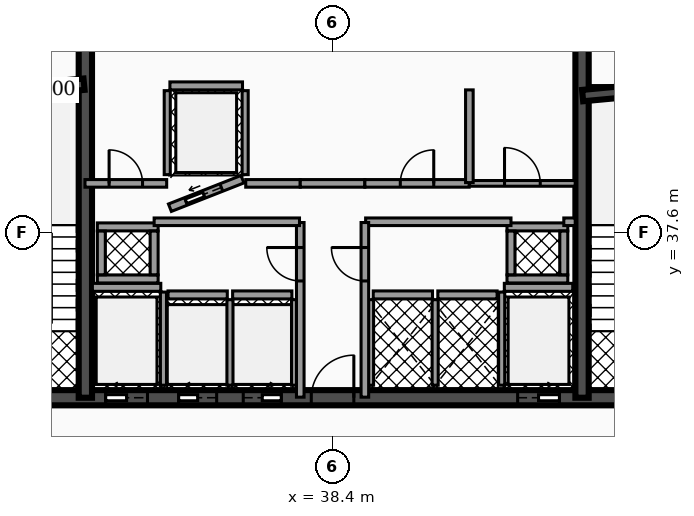
"""IFC4 building model, lengths in metres.
Left out: names, types, materials, properties, quantities, classifications, styles, units other than length and angle.
Written with IfcOpenShell. Run it as: python <this file> out.ifc"""

import sys

from ifc_helpers import new_model, si_unit, direction, frame, frame_2d, origin, place, context, subcontext, project, spatial, rectangle, extrude, element, fill, save


model = new_model("IFC4")
c1 = context("Model", 3, precision=1e-05, world=origin(), true_north=direction((0.0, 1.0)))
c2 = subcontext(c1, "Body", "Model", "MODEL_VIEW")
j1 = project(units=[si_unit("LENGTHUNIT", "METRE"), si_unit("PLANEANGLEUNIT", "RADIAN")], contexts=[c1])
p1 = place(None, origin())
s1 = spatial("IfcSite", under=j1, at=p1, CompositionType="ELEMENT")
p2 = place(p1, origin())
s2 = spatial("IfcBuilding", under=s1, at=p2, CompositionType="ELEMENT")
p3 = place(p2, frame((0.0, 0.0, 187.0)))
s3 = spatial("IfcBuildingStorey", under=s2, at=p3, CompositionType="ELEMENT", Elevation=187.0)
p4 = place(p3, frame((28.4, 33.25, 0.0), z_axis=(0.0, 0.0, 1.0), x_axis=(1.0, 0.0, 0.0)))
e1 = element("IfcWall", 1, at=p4, inside=s3, PredefinedType="SHEAR", context=c2, shape_type="SweptSolid", body=[
    extrude(rectangle(XDim=20.06, YDim=0.4, at=frame_2d((10.03, 0.0))), origin(), (0.0, 0.0, 1.0), 3.5),
])
p5 = place(p4, frame((4.03, 0.0, 0.0)))
e2 = element("IfcOpeningElement", 2, at=p5, cuts=e1, PredefinedType="OPENING", context=c2, shape_type="SweptSolid", body=[
    extrude(rectangle(XDim=1.1, YDim=2.15, at=frame_2d((0.55, 1.075))), frame((0.0, 0.21, 0.0), z_axis=(0.0, -1.0, 0.0), x_axis=(1.0, 0.0, 0.0)), (0.0, 0.0, 1.0), 0.42),
])
p6 = place(p4, frame((14.87, 0.0, 0.0)))
e3 = element("IfcOpeningElement", 3, at=p6, cuts=e1, PredefinedType="OPENING", context=c2, shape_type="SweptSolid", body=[
    extrude(rectangle(XDim=1.1, YDim=2.15, at=frame_2d((0.55, 1.075))), frame((0.0, 0.21, 0.0), z_axis=(0.0, -1.0, 0.0), x_axis=(1.0, 0.0, 0.0)), (0.0, 0.0, 1.0), 0.42),
])
p7 = place(p4, frame((5.95, 0.0, 0.0)))
e4 = element("IfcOpeningElement", 4, at=p7, cuts=e1, PredefinedType="OPENING", context=c2, shape_type="SweptSolid", body=[
    extrude(rectangle(XDim=1.0, YDim=2.1, at=frame_2d((0.5, 1.05))), frame((0.0, 0.21, 0.0), z_axis=(0.0, -1.0, 0.0), x_axis=(1.0, 0.0, 0.0)), (0.0, 0.0, 1.0), 0.42),
])
p8 = place(p4, frame((7.65, 0.0, 0.0)))
e5 = element("IfcOpeningElement", 5, at=p8, cuts=e1, PredefinedType="OPENING", context=c2, shape_type="SweptSolid", body=[
    extrude(rectangle(XDim=1.0, YDim=2.1, at=frame_2d((0.5, 1.05))), frame((0.0, 0.21, 0.0), z_axis=(0.0, -1.0, 0.0), x_axis=(1.0, 0.0, 0.0)), (0.0, 0.0, 1.0), 0.42),
])
p9 = place(p4, frame((1.31, 0.0, 0.0)))
e6 = element("IfcOpeningElement", 6, at=p9, cuts=e1, PredefinedType="OPENING", context=c2, shape_type="SweptSolid", body=[
    extrude(rectangle(XDim=1.1, YDim=2.2, at=frame_2d((0.55, 1.1))), frame((0.0, 0.21, 0.0), z_axis=(0.0, -1.0, 0.0), x_axis=(1.0, 0.0, 0.0)), (0.0, 0.0, 1.0), 0.42),
])
p10 = place(p4, frame((9.44, 0.0, 0.0)))
e7 = element("IfcOpeningElement", 7, at=p10, cuts=e1, PredefinedType="OPENING", context=c2, shape_type="SweptSolid", body=[
    extrude(rectangle(XDim=1.12, YDim=2.05, at=frame_2d((0.56, 1.025))), frame((0.0, 0.21, 0.0), z_axis=(0.0, -1.0, 0.0), x_axis=(1.0, 0.0, 0.0)), (0.0, 0.0, 1.0), 0.42),
])
p11 = place(p4, frame((17.65, 0.0, 0.0)))
e8 = element("IfcOpeningElement", 8, at=p11, cuts=e1, PredefinedType="OPENING", context=c2, shape_type="SweptSolid", body=[
    extrude(rectangle(XDim=1.1, YDim=2.2, at=frame_2d((0.55, 1.1))), frame((0.0, 0.21, 0.0), z_axis=(0.0, -1.0, 0.0), x_axis=(1.0, 0.0, 0.0)), (0.0, 0.0, 1.0), 0.42),
])
for number, where, z_axis, x_axis in (
    (9, (31.895, 33.25, 0.0), (0.0, 0.0, 1.0), (0.0, 1.0, 0.0)),
    (10, (44.965, 33.25, 0.0), (0.0, 0.0, 1.0), (0.0, 1.0, 0.0)),
):
    element("IfcWall", number, at=place(p3, frame(where, z_axis=z_axis, x_axis=x_axis)), inside=s3, PredefinedType="SHEAR", context=c2, shape_type="SweptSolid", body=[
        extrude(rectangle(XDim=10.2, YDim=0.35, at=frame_2d((5.1, 0.0))), origin(), (0.0, 0.0, 1.0), 3.5),
    ])
p12 = place(p3, frame((28.64, 41.2, 0.0), z_axis=(0.0, 0.0, 1.0), x_axis=(0.995687118776, 0.092774789157, 0.0)))
e11 = element("IfcWall", 11, at=p12, inside=s3, PredefinedType="SHEAR", context=c2, shape_type="SweptSolid", body=[
    extrude(rectangle(XDim=3.234, YDim=0.3, at=frame_2d((1.617, 0.0))), origin(), (0.0, 0.0, 1.0), 3.5),
])
p13 = place(p3, frame((44.98, 41.2, 0.0), z_axis=(0.0, 0.0, 1.0), x_axis=(0.995686468965, 0.09278176286, 0.0)))
e12 = element("IfcWall", 12, at=p13, inside=s3, PredefinedType="SHEAR", context=c2, shape_type="SweptSolid", body=[
    extrude(rectangle(XDim=3.234, YDim=0.3, at=frame_2d((1.617, 0.0))), origin(), (0.0, 0.0, 1.0), 3.5),
])
p14 = place(p3, frame((32.08, 36.155, 0.0), z_axis=(0.0, 0.0, 1.0), x_axis=(1.0, 0.0, 0.0)))
e13 = element("IfcWall", 13, at=p14, inside=s3, PredefinedType="SOLIDWALL", context=c2, shape_type="SweptSolid", body=[
    extrude(rectangle(XDim=1.8, YDim=0.21, at=frame_2d((0.9, 0.0))), origin(), (0.0, 0.0, 1.0), 2.472),
])
p15 = place(p3, frame((33.95, 33.58, 0.0), z_axis=(0.0, 0.0, 1.0), x_axis=(0.0, 1.0, 0.0)))
e14 = element("IfcWall", 14, at=p15, inside=s3, PredefinedType="SOLIDWALL", context=c2, shape_type="SweptSolid", body=[
    extrude(rectangle(XDim=2.45, YDim=0.16, at=frame_2d((1.225, 0.0))), origin(), (0.0, 0.0, 1.0), 2.472),
])
p16 = place(p3, frame((42.92, 36.155, 0.0), z_axis=(0.0, 0.0, 1.0), x_axis=(1.0, 0.0, 0.0)))
e15 = element("IfcWall", 15, at=p16, inside=s3, PredefinedType="SOLIDWALL", context=c2, shape_type="SweptSolid", body=[
    extrude(rectangle(XDim=1.8, YDim=0.21, at=frame_2d((0.9, 0.0))), origin(), (0.0, 0.0, 1.0), 2.472),
])
p17 = place(p3, frame((42.85, 33.58, 0.0), z_axis=(0.0, 0.0, 1.0), x_axis=(0.0, 1.0, 0.0)))
e16 = element("IfcWall", 16, at=p17, inside=s3, PredefinedType="SOLIDWALL", context=c2, shape_type="SweptSolid", body=[
    extrude(rectangle(XDim=2.45, YDim=0.16, at=frame_2d((1.225, 0.0))), origin(), (0.0, 0.0, 1.0), 2.472),
])
p18 = place(p3, frame((34.07, 35.955, 0.0), z_axis=(0.0, 0.0, 1.0), x_axis=(1.0, 0.0, 0.0)))
e17 = element("IfcWall", 17, at=p18, inside=s3, PredefinedType="SOLIDWALL", context=c2, shape_type="SweptSolid", body=[
    extrude(rectangle(XDim=1.56, YDim=0.21, at=frame_2d((0.78, 0.0))), origin(), (0.0, 0.0, 1.0), 2.472),
])
p19 = place(p3, frame((35.7, 33.58, 0.0), z_axis=(0.0, 0.0, 1.0), x_axis=(0.0, 1.0, 0.0)))
e18 = element("IfcWall", 18, at=p19, inside=s3, PredefinedType="SOLIDWALL", context=c2, shape_type="SweptSolid", body=[
    extrude(rectangle(XDim=2.25, YDim=0.16, at=frame_2d((1.125, 0.0))), origin(), (0.0, 0.0, 1.0), 2.472),
])
p20 = place(p3, frame((35.77, 35.955, 0.0), z_axis=(0.0, 0.0, 1.0), x_axis=(1.0, 0.0, 0.0)))
e19 = element("IfcWall", 19, at=p20, inside=s3, PredefinedType="SOLIDWALL", context=c2, shape_type="SweptSolid", body=[
    extrude(rectangle(XDim=1.56, YDim=0.21, at=frame_2d((0.78, 0.0))), origin(), (0.0, 0.0, 1.0), 2.472),
])
p21 = place(p3, frame((37.4, 33.58, 0.0), z_axis=(0.0, 0.0, 1.0), x_axis=(0.0, 1.0, 0.0)))
e20 = element("IfcWall", 20, at=p21, inside=s3, PredefinedType="SOLIDWALL", context=c2, shape_type="SweptSolid", body=[
    extrude(rectangle(XDim=2.25, YDim=0.16, at=frame_2d((1.125, 0.0))), origin(), (0.0, 0.0, 1.0), 2.472),
])
p22 = place(p3, frame((34.12, 38.25, 0.0), z_axis=(0.0, 0.0, 1.0), x_axis=(0.930804993012, 0.36551616241, 0.0)))
e21 = element("IfcWall", 21, at=p22, inside=s3, PredefinedType="SOLIDWALL", context=c2, shape_type="SweptSolid", body=[
    extrude(rectangle(XDim=2.052, YDim=0.21, at=frame_2d((1.026, 0.0))), origin(), (0.0, 0.0, 1.0), 2.472),
])
p23 = place(p22, frame((0.455, 0.0, 0.0)))
e22 = element("IfcOpeningElement", 22, at=p23, cuts=e21, PredefinedType="OPENING", context=c2, shape_type="SweptSolid", body=[
    extrude(rectangle(XDim=1.0, YDim=2.1, at=frame_2d((0.5, 1.05))), frame((0.0, 0.115, 0.0), z_axis=(0.0, -1.0, 0.0), x_axis=(1.0, 0.0, 0.0)), (0.0, 0.0, 1.0), 0.23),
])
p24 = place(p3, frame((34.12, 41.455, 0.0), z_axis=(0.0, 0.0, 1.0), x_axis=(1.0, 0.0, 0.0)))
e23 = element("IfcWall", 23, at=p24, inside=s3, PredefinedType="SOLIDWALL", context=c2, shape_type="SweptSolid", body=[
    extrude(rectangle(XDim=1.91, YDim=0.21, at=frame_2d((0.955, 0.0))), origin(), (0.0, 0.0, 1.0), 2.472),
])
for number, where, z_axis, x_axis in (
    (24, (34.05, 39.12, 0.0), (0.0, 0.0, 1.0), (0.0, 1.0, 0.0)),
    (25, (36.1, 39.12, 0.0), (0.0, 0.0, 1.0), (0.0, 1.0, 0.0)),
):
    element("IfcWall", number, at=place(p3, frame(where, z_axis=z_axis, x_axis=x_axis)), inside=s3, PredefinedType="SOLIDWALL", context=c2, shape_type="SweptSolid", body=[
        extrude(rectangle(XDim=2.21, YDim=0.16, at=frame_2d((1.105, 0.0))), origin(), (0.0, 0.0, 1.0), 2.472),
    ])
p25 = place(p3, frame((39.47, 35.955, 0.0), z_axis=(0.0, 0.0, 1.0), x_axis=(1.0, 0.0, 0.0)))
e26 = element("IfcWall", 26, at=p25, inside=s3, PredefinedType="SOLIDWALL", context=c2, shape_type="SweptSolid", body=[
    extrude(rectangle(XDim=1.56, YDim=0.21, at=frame_2d((0.78, 0.0))), origin(), (0.0, 0.0, 1.0), 2.472),
])
for number, where, z_axis, x_axis in (
    (27, (39.4, 33.58, 0.0), (0.0, 0.0, 1.0), (0.0, 1.0, 0.0)),
    (28, (41.1, 33.58, 0.0), (0.0, 0.0, 1.0), (0.0, 1.0, 0.0)),
):
    element("IfcWall", number, at=place(p3, frame(where, z_axis=z_axis, x_axis=x_axis)), inside=s3, PredefinedType="SOLIDWALL", context=c2, shape_type="SweptSolid", body=[
        extrude(rectangle(XDim=2.25, YDim=0.16, at=frame_2d((1.125, 0.0))), origin(), (0.0, 0.0, 1.0), 2.472),
    ])
p26 = place(p3, frame((41.17, 35.955, 0.0), z_axis=(0.0, 0.0, 1.0), x_axis=(1.0, 0.0, 0.0)))
e29 = element("IfcWall", 29, at=p26, inside=s3, PredefinedType="SOLIDWALL", context=c2, shape_type="SweptSolid", body=[
    extrude(rectangle(XDim=1.56, YDim=0.21, at=frame_2d((0.78, 0.0))), origin(), (0.0, 0.0, 1.0), 2.472),
])
for number, where, z_axis, x_axis in (
    (30, (32.21, 36.375, 0.0), (0.0, 0.0, 1.0), (1.0, 0.0, 0.0)),
    (31, (32.21, 37.745, 0.0), (0.0, 0.0, 1.0), (1.0, 0.0, 0.0)),
):
    element("IfcWall", number, at=place(p3, frame(where, z_axis=z_axis, x_axis=x_axis)), inside=s3, PredefinedType="SOLIDWALL", context=c2, shape_type="SweptSolid", body=[
        extrude(rectangle(XDim=1.6, YDim=0.21, at=frame_2d((0.8, 0.0))), origin(), (0.0, 0.0, 1.0), 3.5),
    ])
for number, where, z_axis, x_axis in (
    (32, (32.315, 36.485, 0.0), (0.0, 0.0, 1.0), (0.0, 1.0, 0.0)),
    (33, (33.705, 36.485, 0.0), (0.0, 0.0, 1.0), (0.0, 1.0, 0.0)),
):
    element("IfcWall", number, at=place(p3, frame(where, z_axis=z_axis, x_axis=x_axis)), inside=s3, PredefinedType="SOLIDWALL", context=c2, shape_type="SweptSolid", body=[
        extrude(rectangle(XDim=1.15, YDim=0.21, at=frame_2d((0.575, 0.0))), origin(), (0.0, 0.0, 1.0), 3.5),
    ])
for number, where, z_axis, x_axis in (
    (34, (42.99, 36.375, 0.0), (0.0, 0.0, 1.0), (1.0, 0.0, 0.0)),
    (35, (42.99, 37.745, 0.0), (0.0, 0.0, 1.0), (1.0, 0.0, 0.0)),
):
    element("IfcWall", number, at=place(p3, frame(where, z_axis=z_axis, x_axis=x_axis)), inside=s3, PredefinedType="SOLIDWALL", context=c2, shape_type="SweptSolid", body=[
        extrude(rectangle(XDim=1.6, YDim=0.21, at=frame_2d((0.8, 0.0))), origin(), (0.0, 0.0, 1.0), 3.5),
    ])
for number, where, z_axis, x_axis in (
    (36, (43.095, 36.485, 0.0), (0.0, 0.0, 1.0), (0.0, 1.0, 0.0)),
    (37, (44.485, 36.485, 0.0), (0.0, 0.0, 1.0), (0.0, 1.0, 0.0)),
):
    element("IfcWall", number, at=place(p3, frame(where, z_axis=z_axis, x_axis=x_axis)), inside=s3, PredefinedType="SOLIDWALL", context=c2, shape_type="SweptSolid", body=[
        extrude(rectangle(XDim=1.15, YDim=0.21, at=frame_2d((0.575, 0.0))), origin(), (0.0, 0.0, 1.0), 3.5),
    ])
p27 = place(p3, frame((37.55, 33.265, 0.0), z_axis=(0.0, 0.0, 1.0), x_axis=(0.0, 1.0, 0.0)))
e38 = element("IfcWall", 38, at=p27, inside=s3, PredefinedType="PARTITIONING", context=c2, shape_type="SweptSolid", body=[
    extrude(rectangle(XDim=4.595, YDim=0.2, at=frame_2d((2.298, 0.0))), origin(), (0.0, 0.0, 1.0), 2.457),
])
p28 = place(p27, frame((3.058, 0.0, 0.0)))
e39 = element("IfcOpeningElement", 39, at=p28, cuts=e38, PredefinedType="OPENING", context=c2, shape_type="SweptSolid", body=[
    extrude(rectangle(XDim=0.88, YDim=2.05, at=frame_2d((0.44, 1.025))), frame((0.0, 0.11, 0.0), z_axis=(0.0, -1.0, 0.0), x_axis=(1.0, 0.0, 0.0)), (0.0, 0.0, 1.0), 0.22),
])
p29 = place(p3, frame((33.705, 37.88, 0.0), z_axis=(0.0, 0.0, 1.0), x_axis=(1.0, 0.0, 0.0)))
e40 = element("IfcWall", 40, at=p29, inside=s3, PredefinedType="PARTITIONING", context=c2, shape_type="SweptSolid", body=[
    extrude(rectangle(XDim=3.825, YDim=0.2, at=frame_2d((1.913, 0.0))), origin(), (0.0, 0.0, 1.0), 2.457),
])
p30 = place(p3, frame((31.885, 38.89, 0.0), z_axis=(0.0, 0.0, 1.0), x_axis=(1.0, 0.0, 0.0)))
e41 = element("IfcWall", 41, at=p30, inside=s3, PredefinedType="PARTITIONING", context=c2, shape_type="SweptSolid", body=[
    extrude(rectangle(XDim=2.15, YDim=0.2, at=frame_2d((1.075, 0.0))), origin(), (0.0, 0.0, 1.0), 2.457),
])
p31 = place(p30, frame((0.635, 0.0, 0.0)))
e42 = element("IfcOpeningElement", 42, at=p31, cuts=e41, PredefinedType="OPENING", context=c2, shape_type="SweptSolid", body=[
    extrude(rectangle(XDim=0.88, YDim=2.05, at=frame_2d((0.44, 1.025))), frame((0.0, 0.11, 0.0), z_axis=(0.0, -1.0, 0.0), x_axis=(1.0, 0.0, 0.0)), (0.0, 0.0, 1.0), 0.22),
])
p32 = place(p3, frame((36.115, 38.89, 0.0), z_axis=(0.0, 0.0, 1.0), x_axis=(1.0, 0.0, 0.0)))
e43 = element("IfcWall", 43, at=p32, inside=s3, PredefinedType="PARTITIONING", context=c2, shape_type="SweptSolid", body=[
    extrude(rectangle(XDim=1.435, YDim=0.2, at=frame_2d((0.718, 0.0))), origin(), (0.0, 0.0, 1.0), 2.457),
])
p33 = place(p3, frame((37.55, 38.89, 0.0), z_axis=(0.0, 0.0, 1.0), x_axis=(1.0, 0.0, 0.0)))
e44 = element("IfcWall", 44, at=p33, inside=s3, PredefinedType="PARTITIONING", context=c2, shape_type="SweptSolid", body=[
    extrude(rectangle(XDim=1.7, YDim=0.2, at=frame_2d((0.85, 0.0))), origin(), (0.0, 0.0, 1.0), 2.457),
])
p34 = place(p3, frame((39.25, 38.89, 0.0), z_axis=(0.0, 0.0, 1.0), x_axis=(1.0, 0.0, 0.0)))
e45 = element("IfcWall", 45, at=p34, inside=s3, PredefinedType="PARTITIONING", context=c2, shape_type="SweptSolid", body=[
    extrude(rectangle(XDim=2.745, YDim=0.2, at=frame_2d((1.373, 0.0))), origin(), (0.0, 0.0, 1.0), 2.457),
])
p35 = place(p34, frame((0.933, 0.0, 0.0)))
e46 = element("IfcOpeningElement", 46, at=p35, cuts=e45, PredefinedType="OPENING", context=c2, shape_type="SweptSolid", body=[
    extrude(rectangle(XDim=0.88, YDim=2.05, at=frame_2d((0.44, 1.025))), frame((0.0, 0.11, 0.0), z_axis=(0.0, -1.0, 0.0), x_axis=(1.0, 0.0, 0.0)), (0.0, 0.0, 1.0), 0.22),
])
p36 = place(p3, frame((42.005, 38.89, 0.0), z_axis=(0.0, 0.0, 1.0), x_axis=(1.0, 0.0, 0.0)))
e47 = element("IfcWall", 47, at=p36, inside=s3, PredefinedType="PARTITIONING", context=c2, shape_type="SweptSolid", body=[
    extrude(rectangle(XDim=2.78, YDim=0.15, at=frame_2d((1.39, 0.0))), origin(), (0.0, 0.0, 1.0), 2.457),
])
p37 = place(p36, frame((0.92, 0.0, 0.0)))
e48 = element("IfcOpeningElement", 48, at=p37, cuts=e47, PredefinedType="OPENING", context=c2, shape_type="SweptSolid", body=[
    extrude(rectangle(XDim=0.94, YDim=2.05, at=frame_2d((0.47, 1.025))), frame((0.0, 0.085, 0.0), z_axis=(0.0, -1.0, 0.0), x_axis=(1.0, 0.0, 0.0)), (0.0, 0.0, 1.0), 0.17),
])
p38 = place(p3, frame((39.27, 37.88, 0.0), z_axis=(0.0, 0.0, 1.0), x_axis=(1.0, 0.0, 0.0)))
e49 = element("IfcWall", 49, at=p38, inside=s3, PredefinedType="PARTITIONING", context=c2, shape_type="SweptSolid", body=[
    extrude(rectangle(XDim=3.825, YDim=0.2, at=frame_2d((1.913, 0.0))), origin(), (0.0, 0.0, 1.0), 2.457),
])
p39 = place(p3, frame((44.485, 37.88, 0.0), z_axis=(0.0, 0.0, 1.0), x_axis=(1.0, 0.0, 0.0)))
e50 = element("IfcWall", 50, at=p39, inside=s3, PredefinedType="PARTITIONING", context=c2, shape_type="SweptSolid", body=[
    extrude(rectangle(XDim=0.3, YDim=0.2, at=frame_2d((0.15, 0.0))), origin(), (0.0, 0.0, 1.0), 2.457),
])
p40 = place(p3, frame((39.25, 33.265, 0.0), z_axis=(0.0, 0.0, 1.0), x_axis=(0.0, 1.0, 0.0)))
e51 = element("IfcWall", 51, at=p40, inside=s3, PredefinedType="PARTITIONING", context=c2, shape_type="SweptSolid", body=[
    extrude(rectangle(XDim=4.595, YDim=0.2, at=frame_2d((2.298, 0.0))), origin(), (0.0, 0.0, 1.0), 2.457),
])
p41 = place(p40, frame((3.058, 0.0, 0.0)))
e52 = element("IfcOpeningElement", 52, at=p41, cuts=e51, PredefinedType="OPENING", context=c2, shape_type="SweptSolid", body=[
    extrude(rectangle(XDim=0.88, YDim=2.05, at=frame_2d((0.44, 1.025))), frame((0.0, 0.11, 0.0), z_axis=(0.0, -1.0, 0.0), x_axis=(1.0, 0.0, 0.0)), (0.0, 0.0, 1.0), 0.22),
])
p42 = place(p3, frame((42.0, 38.91, 0.0), z_axis=(0.0, 0.0, 1.0), x_axis=(0.0, 1.0, 0.0)))
e53 = element("IfcWall", 53, at=p42, inside=s3, PredefinedType="PARTITIONING", context=c2, shape_type="SweptSolid", body=[
    extrude(rectangle(XDim=2.44, YDim=0.2, at=frame_2d((1.22, 0.0))), origin(), (0.0, 0.0, 1.0), 2.457),
])
p43 = place(p5, origin())
e54 = element("IfcDoor", 54, at=p43, inside=s3, OperationType="SLIDING_TO_LEFT", PredefinedType="DOOR", context=c2, shape_type="SweptSolid", body=[
    extrude(rectangle(XDim=1.1, YDim=2.15, at=frame_2d((0.55, 1.075))), frame((0.0, 0.025, 0.0), z_axis=(0.0, -1.0, 0.0), x_axis=(1.0, 0.0, 0.0)), (0.0, 0.0, 1.0), 0.05),
])
fill(e2, e54)
p44 = place(p6, origin())
e55 = element("IfcDoor", 55, at=p44, inside=s3, OperationType="SLIDING_TO_RIGHT", PredefinedType="DOOR", context=c2, shape_type="SweptSolid", body=[
    extrude(rectangle(XDim=1.1, YDim=2.15, at=frame_2d((0.55, 1.075))), frame((0.0, 0.025, 0.0), z_axis=(0.0, -1.0, 0.0), x_axis=(1.0, 0.0, 0.0)), (0.0, 0.0, 1.0), 0.05),
])
fill(e3, e55)
p45 = place(p7, origin())
e56 = element("IfcDoor", 56, at=p45, inside=s3, OperationType="SLIDING_TO_LEFT", PredefinedType="DOOR", context=c2, shape_type="SweptSolid", body=[
    extrude(rectangle(XDim=1.0, YDim=2.1, at=frame_2d((0.5, 1.05))), frame((0.0, 0.025, 0.0), z_axis=(0.0, -1.0, 0.0), x_axis=(1.0, 0.0, 0.0)), (0.0, 0.0, 1.0), 0.05),
])
fill(e4, e56)
p46 = place(p8, origin())
e57 = element("IfcDoor", 57, at=p46, inside=s3, OperationType="SLIDING_TO_RIGHT", PredefinedType="DOOR", context=c2, shape_type="SweptSolid", body=[
    extrude(rectangle(XDim=1.0, YDim=2.1, at=frame_2d((0.5, 1.05))), frame((0.0, 0.025, 0.0), z_axis=(0.0, -1.0, 0.0), x_axis=(1.0, 0.0, 0.0)), (0.0, 0.0, 1.0), 0.05),
])
fill(e5, e57)
p47 = place(p23, origin())
e58 = element("IfcDoor", 58, at=p47, inside=s3, OperationType="SLIDING_TO_LEFT", PredefinedType="DOOR", context=c2, shape_type="SweptSolid", body=[
    extrude(rectangle(XDim=1.0, YDim=2.1, at=frame_2d((0.5, 1.05))), frame((0.0, 0.025, 0.0), z_axis=(0.0, -1.0, 0.0), x_axis=(1.0, 0.0, 0.0)), (0.0, 0.0, 1.0), 0.05),
])
fill(e22, e58)
p48 = place(p10, origin())
e59 = element("IfcDoor", 59, at=p48, inside=s3, OperationType="SINGLE_SWING_RIGHT", PredefinedType="DOOR", context=c2, shape_type="SweptSolid", body=[
    extrude(rectangle(XDim=1.12, YDim=2.05, at=frame_2d((0.56, 1.025))), frame((0.0, 0.025, 0.0), z_axis=(0.0, -1.0, 0.0), x_axis=(1.0, 0.0, 0.0)), (0.0, 0.0, 1.0), 0.05),
])
fill(e7, e59)
p49 = place(p28, origin())
e60 = element("IfcDoor", 60, at=p49, inside=s3, OperationType="SINGLE_SWING_RIGHT", PredefinedType="DOOR", context=c2, shape_type="SweptSolid", body=[
    extrude(rectangle(XDim=0.88, YDim=2.05, at=frame_2d((0.44, 1.025))), frame((0.0, 0.025, 0.0), z_axis=(0.0, -1.0, 0.0), x_axis=(1.0, 0.0, 0.0)), (0.0, 0.0, 1.0), 0.05),
])
fill(e39, e60)
p50 = place(p31, origin())
e61 = element("IfcDoor", 61, at=p50, inside=s3, OperationType="SINGLE_SWING_LEFT", PredefinedType="DOOR", context=c2, shape_type="SweptSolid", body=[
    extrude(rectangle(XDim=0.88, YDim=2.05, at=frame_2d((0.44, 1.025))), frame((0.0, 0.025, 0.0), z_axis=(0.0, -1.0, 0.0), x_axis=(1.0, 0.0, 0.0)), (0.0, 0.0, 1.0), 0.05),
])
fill(e42, e61)
p51 = place(p35, origin())
e62 = element("IfcDoor", 62, at=p51, inside=s3, OperationType="SINGLE_SWING_RIGHT", PredefinedType="DOOR", context=c2, shape_type="SweptSolid", body=[
    extrude(rectangle(XDim=0.88, YDim=2.05, at=frame_2d((0.44, 1.025))), frame((0.0, 0.025, 0.0), z_axis=(0.0, -1.0, 0.0), x_axis=(1.0, 0.0, 0.0)), (0.0, 0.0, 1.0), 0.05),
])
fill(e46, e62)
p52 = place(p37, origin())
e63 = element("IfcDoor", 63, at=p52, inside=s3, OperationType="SINGLE_SWING_LEFT", PredefinedType="DOOR", context=c2, shape_type="SweptSolid", body=[
    extrude(rectangle(XDim=0.94, YDim=2.05, at=frame_2d((0.47, 1.025))), frame((0.0, 0.025, 0.0), z_axis=(0.0, -1.0, 0.0), x_axis=(1.0, 0.0, 0.0)), (0.0, 0.0, 1.0), 0.05),
])
fill(e48, e63)
p53 = place(p41, origin())
e64 = element("IfcDoor", 64, at=p53, inside=s3, OperationType="SINGLE_SWING_RIGHT", PredefinedType="DOOR", context=c2, shape_type="SweptSolid", body=[
    extrude(rectangle(XDim=0.88, YDim=2.05, at=frame_2d((0.44, 1.025))), frame((0.0, 0.025, 0.0), z_axis=(0.0, -1.0, 0.0), x_axis=(1.0, 0.0, 0.0)), (0.0, 0.0, 1.0), 0.05),
])
fill(e52, e64)
save(model, sys.argv[1])
